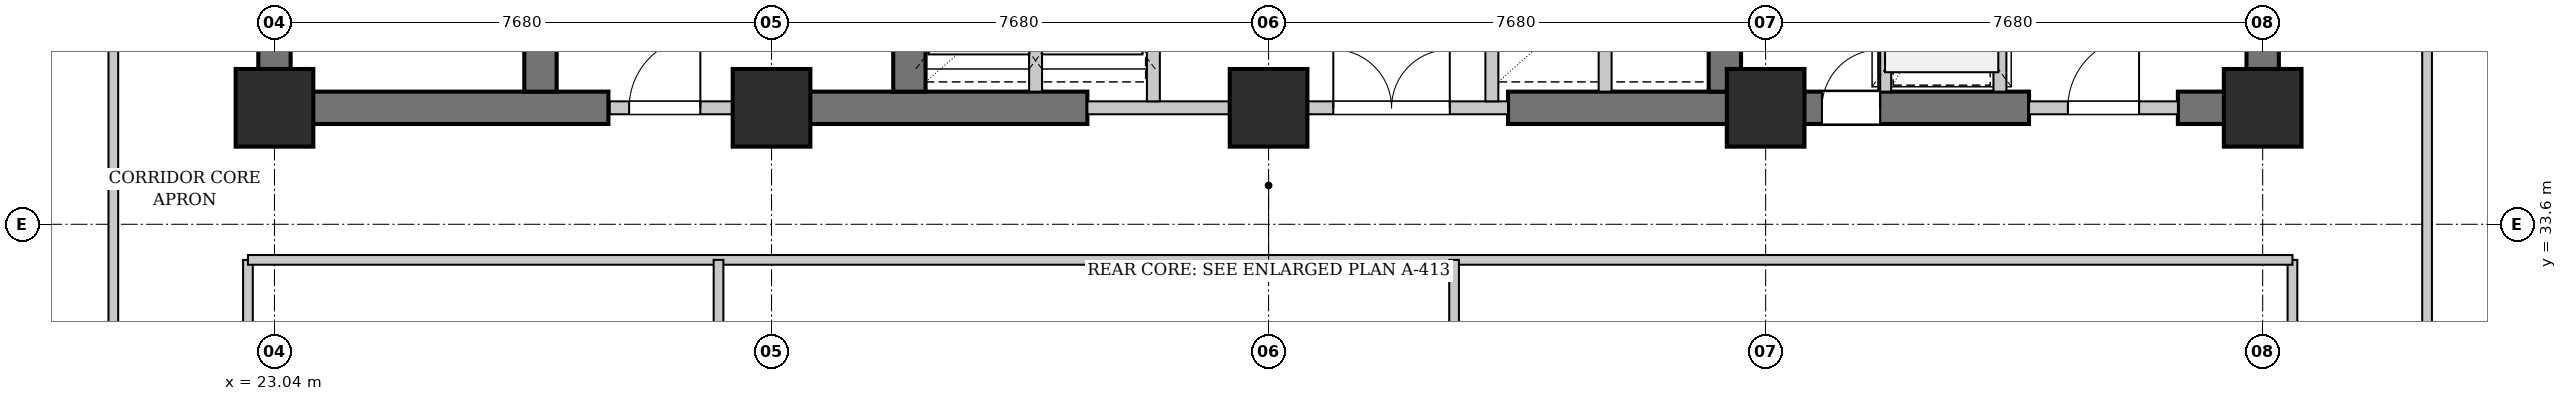
"""IFC4 building model, lengths in metres.
Left out: names, types, materials, properties, quantities, classifications, styles, units other than length and angle.
Written with IfcOpenShell. Run it as: python <this file> out.ifc"""

import sys

from ifc_helpers import new_model, si_unit, direction, frame, frame_2d, origin, origin_2d, place, context, subcontext, project, spatial, rectangle, extrude, element, fill, save


model = new_model("IFC4")
c1 = context("Model", 3, precision=1e-05, world=origin(), true_north=direction((0.0, 1.0)))
c2 = subcontext(c1, "Body", "Model", "MODEL_VIEW")
j1 = project(units=[si_unit("LENGTHUNIT", "METRE"), si_unit("PLANEANGLEUNIT", "RADIAN")], contexts=[c1])
p1 = place(None, origin())
s1 = spatial("IfcSite", under=j1, at=p1, CompositionType="ELEMENT")
p2 = place(p1, origin())
s2 = spatial("IfcBuilding", under=s1, at=p2, CompositionType="ELEMENT")
p3 = place(p2, frame((0.0, 0.0, 47.4)))
s3 = spatial("IfcBuildingStorey", under=s2, at=p3, CompositionType="ELEMENT", Elevation=47.4)
p4 = place(p3, frame((22.79, 35.4, 0.0), z_axis=(0.0, 0.0, 1.0), x_axis=(1.0, 0.0, 0.0)))
e1 = element("IfcWall", 1, at=p4, inside=s3, PredefinedType="SHEAR", context=c2, shape_type="SweptSolid", body=[
    extrude(rectangle(XDim=5.41, YDim=0.5, at=frame_2d((2.705, 0.0))), origin(), (0.0, 0.0, 1.0), 3.18),
])
p5 = place(p3, frame((30.72, 35.4, 0.0), z_axis=(0.0, 0.0, 1.0), x_axis=(1.0, 0.0, 0.0)))
e2 = element("IfcWall", 2, at=p5, inside=s3, PredefinedType="SHEAR", context=c2, shape_type="SweptSolid", body=[
    extrude(rectangle(XDim=4.88, YDim=0.5, at=frame_2d((2.44, 0.0))), origin(), (0.0, 0.0, 1.0), 3.18),
])
p6 = place(p3, frame((42.1, 35.4, 0.0), z_axis=(0.0, 0.0, 1.0), x_axis=(1.0, 0.0, 0.0)))
e3 = element("IfcWall", 3, at=p6, inside=s3, PredefinedType="SHEAR", context=c2, shape_type="SweptSolid", body=[
    extrude(rectangle(XDim=8.05, YDim=0.5, at=frame_2d((4.025, 0.0))), origin(), (0.0, 0.0, 1.0), 3.18),
])
p7 = place(p6, frame((4.85, 0.0, 0.0)))
e4 = element("IfcOpeningElement", 4, at=p7, cuts=e3, PredefinedType="OPENING", context=c2, shape_type="SweptSolid", body=[
    extrude(rectangle(XDim=0.9, YDim=2.15, at=frame_2d((0.45, 1.075))), frame((0.0, 0.26, 0.0), z_axis=(0.0, -1.0, 0.0), x_axis=(1.0, 0.0, 0.0)), (0.0, 0.0, 1.0), 0.52),
])
p8 = place(p3, frame((52.45, 35.4, 0.0), z_axis=(0.0, 0.0, 1.0), x_axis=(1.0, 0.0, 0.0)))
e5 = element("IfcWall", 5, at=p8, inside=s3, PredefinedType="SHEAR", context=c2, shape_type="SweptSolid", body=[
    extrude(rectangle(XDim=1.56, YDim=0.5, at=frame_2d((0.78, 0.0))), origin(), (0.0, 0.0, 1.0), 3.18),
])
p9 = place(p3, frame((23.04, 35.65, 0.0), z_axis=(0.0, 0.0, 1.0), x_axis=(0.0, 1.0, 0.0)))
e6 = element("IfcWall", 6, at=p9, inside=s3, PredefinedType="SHEAR", context=c2, shape_type="SweptSolid", body=[
    extrude(rectangle(XDim=10.3, YDim=0.5, at=frame_2d((5.15, 0.0))), origin(), (0.0, 0.0, 1.0), 3.18),
])
p10 = place(p3, frame((27.15, 35.65, 0.0), z_axis=(0.0, 0.0, 1.0), x_axis=(0.0, 1.0, 0.0)))
e7 = element("IfcWall", 7, at=p10, inside=s3, PredefinedType="SHEAR", context=c2, shape_type="SweptSolid", body=[
    extrude(rectangle(XDim=10.3, YDim=0.5, at=frame_2d((5.15, 0.0))), origin(), (0.0, 0.0, 1.0), 3.18),
])
p11 = place(p10, frame((0.65, 0.0, 0.0)))
e8 = element("IfcOpeningElement", 8, at=p11, cuts=e7, PredefinedType="OPENING", context=c2, shape_type="SweptSolid", body=[
    extrude(rectangle(XDim=1.1, YDim=2.15, at=frame_2d((0.55, 1.075))), frame((0.0, 0.26, 0.0), z_axis=(0.0, -1.0, 0.0), x_axis=(1.0, 0.0, 0.0)), (0.0, 0.0, 1.0), 0.52),
])
for number, where, z_axis, x_axis in (
    (9, (32.85, 35.65, 0.0), (0.0, 0.0, 1.0), (0.0, 1.0, 0.0)),
    (10, (45.45, 35.65, 0.0), (0.0, 0.0, 1.0), (0.0, 1.0, 0.0)),
    (11, (53.76, 35.65, 0.0), (0.0, 0.0, 1.0), (0.0, 1.0, 0.0)),
):
    element("IfcWall", number, at=place(p3, frame(where, z_axis=z_axis, x_axis=x_axis)), inside=s3, PredefinedType="SHEAR", context=c2, shape_type="SweptSolid", body=[
        extrude(rectangle(XDim=10.3, YDim=0.5, at=frame_2d((5.15, 0.0))), origin(), (0.0, 0.0, 1.0), 3.18),
    ])
for number, where, z_axis, x_axis in (
    (12, (23.04, 35.4, 0.0), (0.0, 0.0, 1.0), (1.0, 0.0, 0.0)),
    (13, (30.72, 35.4, 0.0), (0.0, 0.0, 1.0), (1.0, 0.0, 0.0)),
    (14, (38.4, 35.4, 0.0), (0.0, 0.0, 1.0), (1.0, 0.0, 0.0)),
    (15, (46.08, 35.4, 0.0), (0.0, 0.0, 1.0), (1.0, 0.0, 0.0)),
    (16, (53.76, 35.4, 0.0), (0.0, 0.0, 1.0), (1.0, 0.0, 0.0)),
):
    element("IfcColumn", number, at=place(p3, frame(where, z_axis=z_axis, x_axis=x_axis)), inside=s3, PredefinedType="COLUMN", context=c2, shape_type="SweptSolid", body=[
        extrude(rectangle(XDim=1.2, YDim=1.2, at=origin_2d()), origin(), (0.0, 0.0, 1.0), 3.4),
    ])
p12 = place(p3, frame((28.22, 35.4, 0.0), z_axis=(0.0, 0.0, 1.0), x_axis=(1.0, 0.0, 0.0)))
e17 = element("IfcWall", 17, at=p12, inside=s3, PredefinedType="PARTITIONING", context=c2, shape_type="SweptSolid", body=[
    extrude(rectangle(XDim=2.5, YDim=0.2, at=frame_2d((1.25, 0.0))), origin(), (0.0, 0.0, 1.0), 2.475),
])
p13 = place(p12, frame((0.3, 0.0, 0.0)))
e18 = element("IfcOpeningElement", 18, at=p13, cuts=e17, PredefinedType="OPENING", context=c2, shape_type="SweptSolid", body=[
    extrude(rectangle(XDim=1.1, YDim=2.15, at=frame_2d((0.55, 1.075))), frame((0.0, 0.11, 0.0), z_axis=(0.0, -1.0, 0.0), x_axis=(1.0, 0.0, 0.0)), (0.0, 0.0, 1.0), 0.22),
])
p14 = place(p3, frame((35.6, 35.4, 0.0), z_axis=(0.0, 0.0, 1.0), x_axis=(1.0, 0.0, 0.0)))
e19 = element("IfcWall", 19, at=p14, inside=s3, PredefinedType="PARTITIONING", context=c2, shape_type="SweptSolid", body=[
    extrude(rectangle(XDim=6.5, YDim=0.2, at=frame_2d((3.25, 0.0))), origin(), (0.0, 0.0, 1.0), 2.475),
])
p15 = place(p14, frame((3.8, 0.0, 0.0)))
e20 = element("IfcOpeningElement", 20, at=p15, cuts=e19, PredefinedType="OPENING", context=c2, shape_type="SweptSolid", body=[
    extrude(rectangle(XDim=1.8, YDim=2.3, at=frame_2d((0.9, 1.15))), frame((0.0, 0.11, 0.0), z_axis=(0.0, -1.0, 0.0), x_axis=(1.0, 0.0, 0.0)), (0.0, 0.0, 1.0), 0.22),
])
p16 = place(p3, frame((34.8, 35.65, 0.0), z_axis=(0.0, 0.0, 1.0), x_axis=(0.0, 1.0, 0.0)))
e21 = element("IfcWall", 21, at=p16, inside=s3, PredefinedType="PARTITIONING", context=c2, shape_type="SweptSolid", body=[
    extrude(rectangle(XDim=3.25, YDim=0.2, at=frame_2d((1.625, 0.0))), origin(), (0.0, 0.0, 1.0), 3.18),
])
p17 = place(p3, frame((36.62, 35.5, 0.0), z_axis=(0.0, 0.0, 1.0), x_axis=(0.0, 1.0, 0.0)))
e22 = element("IfcWall", 22, at=p17, inside=s3, PredefinedType="PARTITIONING", context=c2, shape_type="SweptSolid", body=[
    extrude(rectangle(XDim=3.4, YDim=0.2, at=frame_2d((1.7, 0.0))), origin(), (0.0, 0.0, 1.0), 3.18),
])
p18 = place(p3, frame((43.6, 35.65, 0.0), z_axis=(0.0, 0.0, 1.0), x_axis=(0.0, 1.0, 0.0)))
e23 = element("IfcWall", 23, at=p18, inside=s3, PredefinedType="PARTITIONING", context=c2, shape_type="SweptSolid", body=[
    extrude(rectangle(XDim=3.25, YDim=0.2, at=frame_2d((1.625, 0.0))), origin(), (0.0, 0.0, 1.0), 3.18),
])
p19 = place(p3, frame((41.85, 35.5, 0.0), z_axis=(0.0, 0.0, 1.0), x_axis=(0.0, 1.0, 0.0)))
e24 = element("IfcWall", 24, at=p19, inside=s3, PredefinedType="PARTITIONING", context=c2, shape_type="SweptSolid", body=[
    extrude(rectangle(XDim=3.4, YDim=0.2, at=frame_2d((1.7, 0.0))), origin(), (0.0, 0.0, 1.0), 3.18),
])
p20 = place(p3, frame((50.15, 35.4, 0.0), z_axis=(0.0, 0.0, 1.0), x_axis=(1.0, 0.0, 0.0)))
e25 = element("IfcWall", 25, at=p20, inside=s3, PredefinedType="PARTITIONING", context=c2, shape_type="SweptSolid", body=[
    extrude(rectangle(XDim=2.3, YDim=0.2, at=frame_2d((1.15, 0.0))), origin(), (0.0, 0.0, 1.0), 2.475),
])
p21 = place(p20, frame((0.6, 0.0, 0.0)))
e26 = element("IfcOpeningElement", 26, at=p21, cuts=e25, PredefinedType="OPENING", context=c2, shape_type="SweptSolid", body=[
    extrude(rectangle(XDim=1.1, YDim=2.15, at=frame_2d((0.55, 1.075))), frame((0.0, 0.11, 0.0), z_axis=(0.0, -1.0, 0.0), x_axis=(1.0, 0.0, 0.0)), (0.0, 0.0, 1.0), 0.22),
])
p22 = place(p3, frame((49.7, 35.65, 0.0), z_axis=(0.0, 0.0, 1.0), x_axis=(0.0, 1.0, 0.0)))
e27 = element("IfcWall", 27, at=p22, inside=s3, PredefinedType="PARTITIONING", context=c2, shape_type="SweptSolid", body=[
    extrude(rectangle(XDim=3.15, YDim=0.2, at=frame_2d((1.575, 0.0))), origin(), (0.0, 0.0, 1.0), 3.18),
])
p23 = place(p22, frame((0.85, 0.0, 0.0)))
e28 = element("IfcOpeningElement", 28, at=p23, cuts=e27, PredefinedType="OPENING", context=c2, shape_type="SweptSolid", body=[
    extrude(rectangle(XDim=1.2, YDim=2.2, at=frame_2d((0.6, 1.1))), frame((0.0, 0.11, 0.0), z_axis=(0.0, -1.0, 0.0), x_axis=(1.0, 0.0, 0.0)), (0.0, 0.0, 1.0), 0.22),
])
p24 = place(p3, frame((47.92, 35.65, 0.0), z_axis=(0.0, 0.0, 1.0), x_axis=(0.0, 1.0, 0.0)))
e29 = element("IfcWall", 29, at=p24, inside=s3, PredefinedType="PARTITIONING", context=c2, shape_type="SweptSolid", body=[
    extrude(rectangle(XDim=3.15, YDim=0.2, at=frame_2d((1.575, 0.0))), origin(), (0.0, 0.0, 1.0), 3.18),
])
p25 = place(p3, frame((20.55, 22.3, 0.0), z_axis=(0.0, 0.0, 1.0), x_axis=(0.0, 1.0, 0.0)))
e30 = element("IfcWall", 30, at=p25, inside=s3, PredefinedType="PARTITIONING", context=c2, shape_type="SweptSolid", body=[
    extrude(rectangle(XDim=26.22, YDim=0.15, at=frame_2d((13.11, 0.0))), origin(), (0.0, 0.0, 1.0), 3.18),
])
p26 = place(p25, frame((0.528, 0.0, 0.0)))
e31 = element("IfcOpeningElement", 31, at=p26, cuts=e30, PredefinedType="OPENING", context=c2, shape_type="SweptSolid", body=[
    extrude(rectangle(XDim=0.9, YDim=2.15, at=frame_2d((0.45, 1.075))), frame((0.0, 0.085, 0.0), z_axis=(0.0, -1.0, 0.0), x_axis=(1.0, 0.0, 0.0)), (0.0, 0.0, 1.0), 0.17),
])
p27 = place(p3, frame((56.3, 22.3, 0.0), z_axis=(0.0, 0.0, 1.0), x_axis=(0.0, 1.0, 0.0)))
e32 = element("IfcWall", 32, at=p27, inside=s3, PredefinedType="PARTITIONING", context=c2, shape_type="SweptSolid", body=[
    extrude(rectangle(XDim=26.22, YDim=0.15, at=frame_2d((13.11, 0.0))), origin(), (0.0, 0.0, 1.0), 3.18),
])
p28 = place(p27, frame((0.528, 0.0, 0.0)))
e33 = element("IfcOpeningElement", 33, at=p28, cuts=e32, PredefinedType="OPENING", context=c2, shape_type="SweptSolid", body=[
    extrude(rectangle(XDim=0.9, YDim=2.15, at=frame_2d((0.45, 1.075))), frame((0.0, 0.085, 0.0), z_axis=(0.0, -1.0, 0.0), x_axis=(1.0, 0.0, 0.0)), (0.0, 0.0, 1.0), 0.17),
])
for number, where, z_axis, x_axis in (
    (34, (22.63, 24.38, 0.0), (0.0, 0.0, 1.0), (0.0, 1.0, 0.0)),
    (35, (54.22, 24.38, 0.0), (0.0, 0.0, 1.0), (0.0, 1.0, 0.0)),
):
    element("IfcWall", number, at=place(p3, frame(where, z_axis=z_axis, x_axis=x_axis)), inside=s3, PredefinedType="PARTITIONING", context=c2, shape_type="SweptSolid", body=[
        extrude(rectangle(XDim=8.67, YDim=0.15, at=frame_2d((4.335, 0.0))), origin(), (0.0, 0.0, 1.0), 3.18),
    ])
p29 = place(p3, frame((22.63, 33.05, 0.0), z_axis=(0.0, 0.0, 1.0), x_axis=(1.0, 0.0, 0.0)))
e36 = element("IfcWall", 36, at=p29, inside=s3, PredefinedType="PARTITIONING", context=c2, shape_type="SweptSolid", body=[
    extrude(rectangle(XDim=31.59, YDim=0.15, at=frame_2d((15.795, 0.0))), origin(), (0.0, 0.0, 1.0), 3.18),
])
for number, where, z_axis, x_axis in (
    (37, (29.901, 24.38, 0.0), (0.0, 0.0, 1.0), (0.0, 1.0, 0.0)),
    (38, (41.266, 24.38, 0.0), (0.0, 0.0, 1.0), (0.0, 1.0, 0.0)),
):
    element("IfcWall", number, at=place(p3, frame(where, z_axis=z_axis, x_axis=x_axis)), inside=s3, PredefinedType="PARTITIONING", context=c2, shape_type="SweptSolid", body=[
        extrude(rectangle(XDim=8.67, YDim=0.15, at=frame_2d((4.335, 0.0))), origin(), (0.0, 0.0, 1.0), 3.18),
    ])
p30 = place(p13, origin())
e39 = element("IfcDoor", 39, at=p30, inside=s3, OperationType="SINGLE_SWING_RIGHT", PredefinedType="DOOR", context=c2, shape_type="SweptSolid", body=[
    extrude(rectangle(XDim=1.1, YDim=2.15, at=frame_2d((0.55, 1.075))), frame((0.0, 0.025, 0.0), z_axis=(0.0, -1.0, 0.0), x_axis=(1.0, 0.0, 0.0)), (0.0, 0.0, 1.0), 0.05),
])
fill(e18, e39)
p31 = place(p15, origin())
e40 = element("IfcDoor", 40, at=p31, inside=s3, OperationType="DOUBLE_DOOR_SINGLE_SWING", PredefinedType="DOOR", context=c2, shape_type="SweptSolid", body=[
    extrude(rectangle(XDim=1.8, YDim=2.3, at=frame_2d((0.9, 1.15))), frame((0.0, 0.025, 0.0), z_axis=(0.0, -1.0, 0.0), x_axis=(1.0, 0.0, 0.0)), (0.0, 0.0, 1.0), 0.05),
])
fill(e20, e40)
p32 = place(p21, origin())
e41 = element("IfcDoor", 41, at=p32, inside=s3, OperationType="SINGLE_SWING_RIGHT", PredefinedType="DOOR", context=c2, shape_type="SweptSolid", body=[
    extrude(rectangle(XDim=1.1, YDim=2.15, at=frame_2d((0.55, 1.075))), frame((0.0, 0.025, 0.0), z_axis=(0.0, -1.0, 0.0), x_axis=(1.0, 0.0, 0.0)), (0.0, 0.0, 1.0), 0.05),
])
fill(e26, e41)
p33 = place(p7, origin())
e42 = element("IfcDoor", 42, at=p33, inside=s3, OperationType="SINGLE_SWING_RIGHT", PredefinedType="DOOR", context=c2, shape_type="SweptSolid", body=[
    extrude(rectangle(XDim=0.9, YDim=2.15, at=frame_2d((0.45, 1.075))), frame((0.0, 0.025, 0.0), z_axis=(0.0, -1.0, 0.0), x_axis=(1.0, 0.0, 0.0)), (0.0, 0.0, 1.0), 0.05),
])
fill(e4, e42)
save(model, sys.argv[1])
